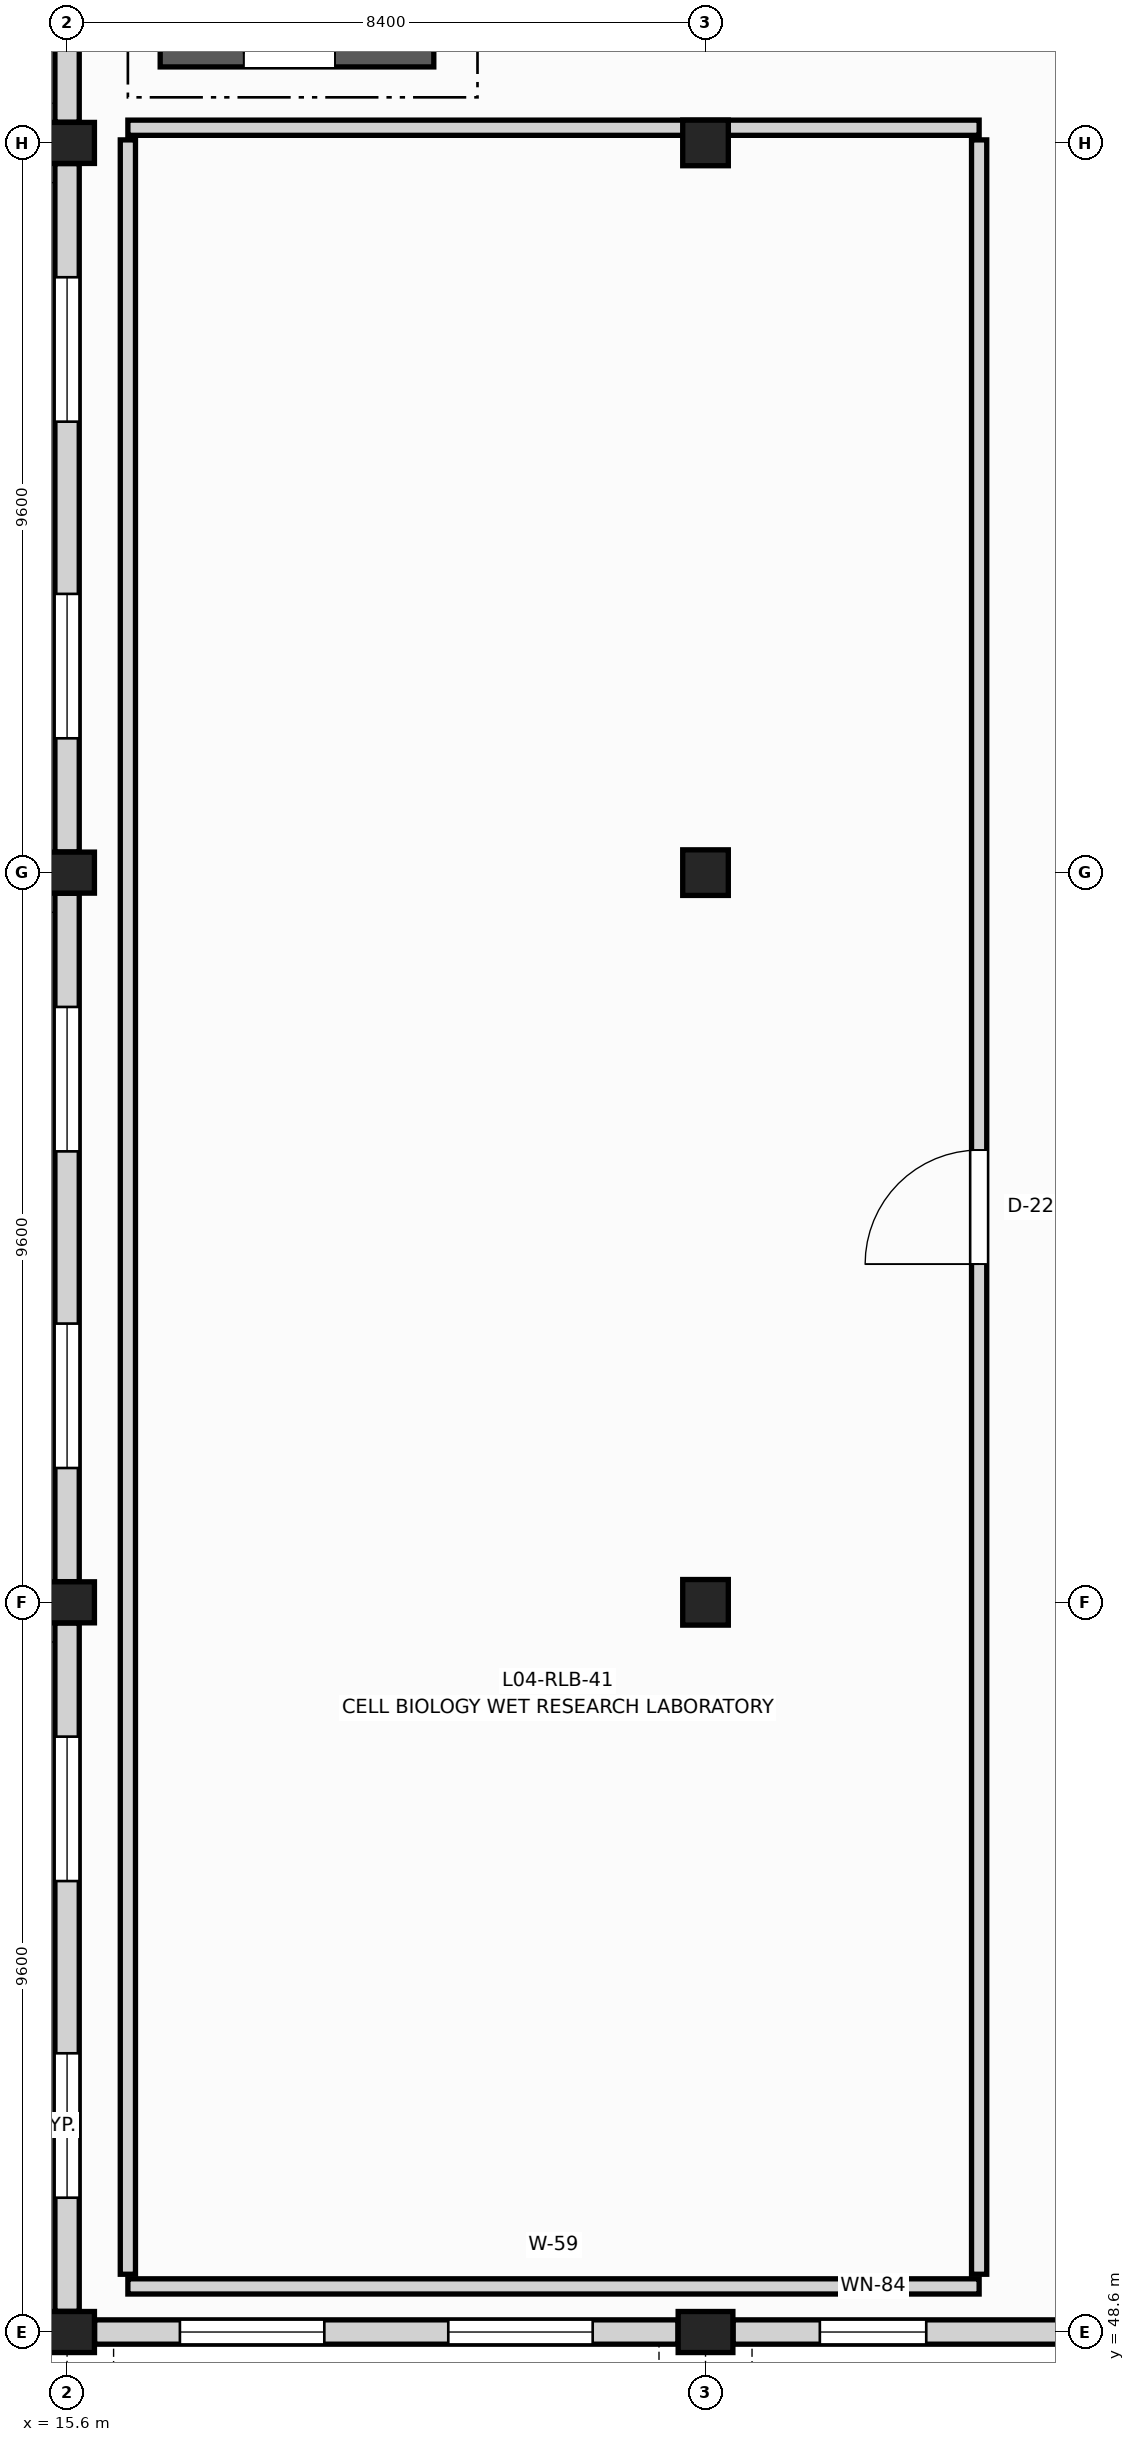
"""IFC4 building model, lengths in metres.
Left out: names, types, materials, properties, quantities, classifications, styles, units other than length and angle.
Written with IfcOpenShell. Run it as: python <this file> out.ifc"""

import sys

from ifc_helpers import new_model, si_unit, direction, frame, frame_2d, origin, origin_2d, place, context, subcontext, project, spatial, rectangle, extrude, element, fill, save


model = new_model("IFC4")
c1 = context("Model", 3, precision=1e-05, world=origin(), true_north=direction((0.0, 1.0)))
c2 = subcontext(c1, "Body", "Model", "MODEL_VIEW")
j1 = project(units=[si_unit("LENGTHUNIT", "METRE"), si_unit("PLANEANGLEUNIT", "RADIAN")], contexts=[c1])
p1 = place(None, origin())
s1 = spatial("IfcSite", under=j1, at=p1, CompositionType="ELEMENT")
p2 = place(p1, origin())
s2 = spatial("IfcBuilding", under=s1, at=p2, CompositionType="ELEMENT")
p3 = place(p2, frame((0.0, 0.0, 18.3)))
s3 = spatial("IfcBuildingStorey", under=s2, at=p3, CompositionType="ELEMENT", Elevation=18.3)
for number, where, z_axis, x_axis in (
    (1, (15.6, 48.6, 0.0), (0.0, 0.0, 1.0), (1.0, 0.0, 0.0)),
    (2, (15.6, 58.2, 0.0), (0.0, 0.0, 1.0), (1.0, 0.0, 0.0)),
    (3, (15.6, 67.8, 0.0), (0.0, 0.0, 1.0), (1.0, 0.0, 0.0)),
    (4, (15.6, 77.4, 0.0), (0.0, 0.0, 1.0), (1.0, 0.0, 0.0)),
    (5, (24.0, 48.6, 0.0), (0.0, 0.0, 1.0), (1.0, 0.0, 0.0)),
):
    element("IfcColumn", number, at=place(p3, frame(where, z_axis=z_axis, x_axis=x_axis)), inside=s3, PredefinedType="COLUMN", context=c2, shape_type="SweptSolid", body=[
        extrude(rectangle(XDim=0.72, YDim=0.54, at=origin_2d()), origin(), (0.0, 0.0, 1.0), 3.9),
    ])
for number, where, z_axis, x_axis in (
    (6, (24.0, 58.2, 0.0), (0.0, 0.0, 1.0), (1.0, 0.0, 0.0)),
    (7, (24.0, 67.8, 0.0), (0.0, 0.0, 1.0), (1.0, 0.0, 0.0)),
    (8, (24.0, 77.4, 0.0), (0.0, 0.0, 1.0), (1.0, 0.0, 0.0)),
):
    element("IfcColumn", number, at=place(p3, frame(where, z_axis=z_axis, x_axis=x_axis)), inside=s3, PredefinedType="COLUMN", context=c2, shape_type="SweptSolid", body=[
        extrude(rectangle(XDim=0.6, YDim=0.6, at=origin_2d()), origin(), (0.0, 0.0, 1.0), 3.9),
    ])
p4 = place(p3, frame((15.6, 48.872, 0.0), z_axis=(0.0, 0.0, 1.0), x_axis=(0.0, 1.0, 0.0)))
e9 = element("IfcWall", 9, at=p4, inside=s3, PredefinedType="SOLIDWALL", context=c2, shape_type="SweptSolid", body=[
    extrude(rectangle(XDim=9.056, YDim=0.32, at=frame_2d((4.528, 0.0))), origin(), (0.0, 0.0, 1.0), 3.08),
])
p5 = place(p4, frame((1.495, 0.0, 0.85)))
e10 = element("IfcOpeningElement", 10, at=p5, cuts=e9, PredefinedType="OPENING", context=c2, shape_type="SweptSolid", body=[
    extrude(rectangle(XDim=1.9, YDim=1.85, at=frame_2d((0.95, 0.925))), frame((0.0, 0.17, 0.0), z_axis=(0.0, -1.0, 0.0), x_axis=(1.0, 0.0, 0.0)), (0.0, 0.0, 1.0), 0.34),
])
p6 = place(p4, frame((5.661, 0.0, 0.85)))
e11 = element("IfcOpeningElement", 11, at=p6, cuts=e9, PredefinedType="OPENING", context=c2, shape_type="SweptSolid", body=[
    extrude(rectangle(XDim=1.9, YDim=1.85, at=frame_2d((0.95, 0.925))), frame((0.0, 0.17, 0.0), z_axis=(0.0, -1.0, 0.0), x_axis=(1.0, 0.0, 0.0)), (0.0, 0.0, 1.0), 0.34),
])
p7 = place(p3, frame((15.6, 58.472, 0.0), z_axis=(0.0, 0.0, 1.0), x_axis=(0.0, 1.0, 0.0)))
e12 = element("IfcWall", 12, at=p7, inside=s3, PredefinedType="SOLIDWALL", context=c2, shape_type="SweptSolid", body=[
    extrude(rectangle(XDim=9.056, YDim=0.32, at=frame_2d((4.528, 0.0))), origin(), (0.0, 0.0, 1.0), 3.08),
])
p8 = place(p7, frame((1.495, 0.0, 0.85)))
e13 = element("IfcOpeningElement", 13, at=p8, cuts=e12, PredefinedType="OPENING", context=c2, shape_type="SweptSolid", body=[
    extrude(rectangle(XDim=1.9, YDim=1.85, at=frame_2d((0.95, 0.925))), frame((0.0, 0.17, 0.0), z_axis=(0.0, -1.0, 0.0), x_axis=(1.0, 0.0, 0.0)), (0.0, 0.0, 1.0), 0.34),
])
p9 = place(p7, frame((5.661, 0.0, 0.85)))
e14 = element("IfcOpeningElement", 14, at=p9, cuts=e12, PredefinedType="OPENING", context=c2, shape_type="SweptSolid", body=[
    extrude(rectangle(XDim=1.9, YDim=1.85, at=frame_2d((0.95, 0.925))), frame((0.0, 0.17, 0.0), z_axis=(0.0, -1.0, 0.0), x_axis=(1.0, 0.0, 0.0)), (0.0, 0.0, 1.0), 0.34),
])
p10 = place(p3, frame((15.6, 68.072, 0.0), z_axis=(0.0, 0.0, 1.0), x_axis=(0.0, 1.0, 0.0)))
e15 = element("IfcWall", 15, at=p10, inside=s3, PredefinedType="SOLIDWALL", context=c2, shape_type="SweptSolid", body=[
    extrude(rectangle(XDim=9.056, YDim=0.32, at=frame_2d((4.528, 0.0))), origin(), (0.0, 0.0, 1.0), 3.08),
])
p11 = place(p10, frame((1.495, 0.0, 0.85)))
e16 = element("IfcOpeningElement", 16, at=p11, cuts=e15, PredefinedType="OPENING", context=c2, shape_type="SweptSolid", body=[
    extrude(rectangle(XDim=1.9, YDim=1.85, at=frame_2d((0.95, 0.925))), frame((0.0, 0.17, 0.0), z_axis=(0.0, -1.0, 0.0), x_axis=(1.0, 0.0, 0.0)), (0.0, 0.0, 1.0), 0.34),
])
p12 = place(p10, frame((5.661, 0.0, 0.85)))
e17 = element("IfcOpeningElement", 17, at=p12, cuts=e15, PredefinedType="OPENING", context=c2, shape_type="SweptSolid", body=[
    extrude(rectangle(XDim=1.9, YDim=1.85, at=frame_2d((0.95, 0.925))), frame((0.0, 0.17, 0.0), z_axis=(0.0, -1.0, 0.0), x_axis=(1.0, 0.0, 0.0)), (0.0, 0.0, 1.0), 0.34),
])
p13 = place(p3, frame((15.6, 77.672, 0.0), z_axis=(0.0, 0.0, 1.0), x_axis=(0.0, 1.0, 0.0)))
e18 = element("IfcWall", 18, at=p13, inside=s3, PredefinedType="SOLIDWALL", context=c2, shape_type="SweptSolid", body=[
    extrude(rectangle(XDim=8.976, YDim=0.32, at=frame_2d((4.488, 0.0))), origin(), (0.0, 0.0, 1.0), 3.08),
])
p14 = place(p13, frame((1.473, 0.0, 0.85)))
e19 = element("IfcOpeningElement", 19, at=p14, cuts=e18, PredefinedType="OPENING", context=c2, shape_type="SweptSolid", body=[
    extrude(rectangle(XDim=1.9, YDim=1.85, at=frame_2d((0.95, 0.925))), frame((0.0, 0.17, 0.0), z_axis=(0.0, -1.0, 0.0), x_axis=(1.0, 0.0, 0.0)), (0.0, 0.0, 1.0), 0.34),
])
p15 = place(p13, frame((5.603, 0.0, 0.85)))
e20 = element("IfcOpeningElement", 20, at=p15, cuts=e18, PredefinedType="OPENING", context=c2, shape_type="SweptSolid", body=[
    extrude(rectangle(XDim=1.9, YDim=1.85, at=frame_2d((0.95, 0.925))), frame((0.0, 0.17, 0.0), z_axis=(0.0, -1.0, 0.0), x_axis=(1.0, 0.0, 0.0)), (0.0, 0.0, 1.0), 0.34),
])
p16 = place(p3, frame((15.962, 48.6, 0.0), z_axis=(0.0, 0.0, 1.0), x_axis=(1.0, 0.0, 0.0)))
e21 = element("IfcWall", 21, at=p16, inside=s3, PredefinedType="SOLIDWALL", context=c2, shape_type="SweptSolid", body=[
    extrude(rectangle(XDim=7.676, YDim=0.32, at=frame_2d((3.838, 0.0))), origin(), (0.0, 0.0, 1.0), 3.08),
])
p17 = place(p16, frame((1.123, 0.0, 0.85)))
e22 = element("IfcOpeningElement", 22, at=p17, cuts=e21, PredefinedType="OPENING", context=c2, shape_type="SweptSolid", body=[
    extrude(rectangle(XDim=1.9, YDim=1.85, at=frame_2d((0.95, 0.925))), frame((0.0, 0.17, 0.0), z_axis=(0.0, -1.0, 0.0), x_axis=(1.0, 0.0, 0.0)), (0.0, 0.0, 1.0), 0.34),
])
p18 = place(p16, frame((4.654, 0.0, 0.85)))
e23 = element("IfcOpeningElement", 23, at=p18, cuts=e21, PredefinedType="OPENING", context=c2, shape_type="SweptSolid", body=[
    extrude(rectangle(XDim=1.9, YDim=1.85, at=frame_2d((0.95, 0.925))), frame((0.0, 0.17, 0.0), z_axis=(0.0, -1.0, 0.0), x_axis=(1.0, 0.0, 0.0)), (0.0, 0.0, 1.0), 0.34),
])
p19 = place(p3, frame((24.362, 48.6, 0.0), z_axis=(0.0, 0.0, 1.0), x_axis=(1.0, 0.0, 0.0)))
e24 = element("IfcWall", 24, at=p19, inside=s3, PredefinedType="SOLIDWALL", context=c2, shape_type="SweptSolid", body=[
    extrude(rectangle(XDim=7.676, YDim=0.32, at=frame_2d((3.838, 0.0))), origin(), (0.0, 0.0, 1.0), 3.08),
])
p20 = place(p19, frame((1.142, 0.0, 0.85)))
e25 = element("IfcOpeningElement", 25, at=p20, cuts=e24, PredefinedType="OPENING", context=c2, shape_type="SweptSolid", body=[
    extrude(rectangle(XDim=1.4, YDim=1.65, at=frame_2d((0.7, 0.825))), frame((0.0, 0.17, 0.0), z_axis=(0.0, -1.0, 0.0), x_axis=(1.0, 0.0, 0.0)), (0.0, 0.0, 1.0), 0.34),
])
p21 = place(p3, frame((16.825, 78.575, 0.0), z_axis=(0.0, 0.0, 1.0), x_axis=(1.0, 0.0, 0.0)))
e26 = element("IfcWall", 26, at=p21, inside=s3, PredefinedType="SHEAR", context=c2, shape_type="SweptSolid", body=[
    extrude(rectangle(XDim=3.6, YDim=0.35, at=frame_2d((1.8, 0.0))), origin(), (0.0, 0.0, 1.0), 3.9),
])
p22 = place(p21, frame((1.1, 0.0, 0.0)))
e27 = element("IfcOpeningElement", 27, at=p22, cuts=e26, PredefinedType="OPENING", context=c2, shape_type="SweptSolid", body=[
    extrude(rectangle(XDim=1.2, YDim=2.2, at=frame_2d((0.6, 1.1))), frame((0.0, 0.185, 0.0), z_axis=(0.0, -1.0, 0.0), x_axis=(1.0, 0.0, 0.0)), (0.0, 0.0, 1.0), 0.37),
])
for number, where, z_axis, x_axis in (
    (28, (16.4, 49.2, 0.0), (0.0, 0.0, 1.0), (1.0, 0.0, 0.0)),
    (29, (16.4, 77.6, 0.0), (0.0, 0.0, 1.0), (1.0, 0.0, 0.0)),
):
    element("IfcWall", number, at=place(p3, frame(where, z_axis=z_axis, x_axis=x_axis)), inside=s3, PredefinedType="PARTITIONING", context=c2, shape_type="SweptSolid", body=[
        extrude(rectangle(XDim=11.2, YDim=0.2, at=frame_2d((5.6, 0.0))), origin(), (0.0, 0.0, 1.0), 3.15),
    ])
p23 = place(p3, frame((16.4, 49.36, 0.0), z_axis=(0.0, 0.0, 1.0), x_axis=(0.0, 1.0, 0.0)))
e30 = element("IfcWall", 30, at=p23, inside=s3, PredefinedType="PARTITIONING", context=c2, shape_type="SweptSolid", body=[
    extrude(rectangle(XDim=28.08, YDim=0.2, at=frame_2d((14.04, 0.0))), origin(), (0.0, 0.0, 1.0), 3.15),
])
p24 = place(p3, frame((27.6, 49.36, 0.0), z_axis=(0.0, 0.0, 1.0), x_axis=(0.0, 1.0, 0.0)))
e31 = element("IfcWall", 31, at=p24, inside=s3, PredefinedType="PARTITIONING", context=c2, shape_type="SweptSolid", body=[
    extrude(rectangle(XDim=28.08, YDim=0.2, at=frame_2d((14.04, 0.0))), origin(), (0.0, 0.0, 1.0), 3.15),
])
p25 = place(p24, frame((13.29, 0.0, 0.0)))
e32 = element("IfcOpeningElement", 32, at=p25, cuts=e31, PredefinedType="OPENING", context=c2, shape_type="SweptSolid", body=[
    extrude(rectangle(XDim=1.5, YDim=2.2, at=frame_2d((0.75, 1.1))), frame((0.0, 0.11, 0.0), z_axis=(0.0, -1.0, 0.0), x_axis=(1.0, 0.0, 0.0)), (0.0, 0.0, 1.0), 0.22),
])
p26 = place(p5, origin())
e33 = element("IfcWindow", 33, at=p26, inside=s3, PartitioningType="SINGLE_PANEL", PredefinedType="WINDOW", context=c2, shape_type="SweptSolid", body=[
    extrude(rectangle(XDim=1.9, YDim=1.85, at=frame_2d((0.95, 0.925))), frame((0.0, 0.03, 0.0), z_axis=(0.0, -1.0, 0.0), x_axis=(1.0, 0.0, 0.0)), (0.0, 0.0, 1.0), 0.06),
])
fill(e10, e33)
p27 = place(p6, origin())
e34 = element("IfcWindow", 34, at=p27, inside=s3, PartitioningType="SINGLE_PANEL", PredefinedType="WINDOW", context=c2, shape_type="SweptSolid", body=[
    extrude(rectangle(XDim=1.9, YDim=1.85, at=frame_2d((0.95, 0.925))), frame((0.0, 0.03, 0.0), z_axis=(0.0, -1.0, 0.0), x_axis=(1.0, 0.0, 0.0)), (0.0, 0.0, 1.0), 0.06),
])
fill(e11, e34)
p28 = place(p8, origin())
e35 = element("IfcWindow", 35, at=p28, inside=s3, PartitioningType="SINGLE_PANEL", PredefinedType="WINDOW", context=c2, shape_type="SweptSolid", body=[
    extrude(rectangle(XDim=1.9, YDim=1.85, at=frame_2d((0.95, 0.925))), frame((0.0, 0.03, 0.0), z_axis=(0.0, -1.0, 0.0), x_axis=(1.0, 0.0, 0.0)), (0.0, 0.0, 1.0), 0.06),
])
fill(e13, e35)
p29 = place(p9, origin())
e36 = element("IfcWindow", 36, at=p29, inside=s3, PartitioningType="SINGLE_PANEL", PredefinedType="WINDOW", context=c2, shape_type="SweptSolid", body=[
    extrude(rectangle(XDim=1.9, YDim=1.85, at=frame_2d((0.95, 0.925))), frame((0.0, 0.03, 0.0), z_axis=(0.0, -1.0, 0.0), x_axis=(1.0, 0.0, 0.0)), (0.0, 0.0, 1.0), 0.06),
])
fill(e14, e36)
p30 = place(p11, origin())
e37 = element("IfcWindow", 37, at=p30, inside=s3, PartitioningType="SINGLE_PANEL", PredefinedType="WINDOW", context=c2, shape_type="SweptSolid", body=[
    extrude(rectangle(XDim=1.9, YDim=1.85, at=frame_2d((0.95, 0.925))), frame((0.0, 0.03, 0.0), z_axis=(0.0, -1.0, 0.0), x_axis=(1.0, 0.0, 0.0)), (0.0, 0.0, 1.0), 0.06),
])
fill(e16, e37)
p31 = place(p12, origin())
e38 = element("IfcWindow", 38, at=p31, inside=s3, PartitioningType="SINGLE_PANEL", PredefinedType="WINDOW", context=c2, shape_type="SweptSolid", body=[
    extrude(rectangle(XDim=1.9, YDim=1.85, at=frame_2d((0.95, 0.925))), frame((0.0, 0.03, 0.0), z_axis=(0.0, -1.0, 0.0), x_axis=(1.0, 0.0, 0.0)), (0.0, 0.0, 1.0), 0.06),
])
fill(e17, e38)
p32 = place(p17, origin())
e39 = element("IfcWindow", 39, at=p32, inside=s3, PartitioningType="SINGLE_PANEL", PredefinedType="WINDOW", context=c2, shape_type="SweptSolid", body=[
    extrude(rectangle(XDim=1.9, YDim=1.85, at=frame_2d((0.95, 0.925))), frame((0.0, 0.03, 0.0), z_axis=(0.0, -1.0, 0.0), x_axis=(1.0, 0.0, 0.0)), (0.0, 0.0, 1.0), 0.06),
])
fill(e22, e39)
p33 = place(p18, origin())
e40 = element("IfcWindow", 40, at=p33, inside=s3, PartitioningType="SINGLE_PANEL", PredefinedType="WINDOW", context=c2, shape_type="SweptSolid", body=[
    extrude(rectangle(XDim=1.9, YDim=1.85, at=frame_2d((0.95, 0.925))), frame((0.0, 0.03, 0.0), z_axis=(0.0, -1.0, 0.0), x_axis=(1.0, 0.0, 0.0)), (0.0, 0.0, 1.0), 0.06),
])
fill(e23, e40)
p34 = place(p20, origin())
e41 = element("IfcWindow", 41, at=p34, inside=s3, PartitioningType="SINGLE_PANEL", PredefinedType="WINDOW", context=c2, shape_type="SweptSolid", body=[
    extrude(rectangle(XDim=1.4, YDim=1.65, at=frame_2d((0.7, 0.825))), frame((0.0, 0.03, 0.0), z_axis=(0.0, -1.0, 0.0), x_axis=(1.0, 0.0, 0.0)), (0.0, 0.0, 1.0), 0.06),
])
fill(e25, e41)
p35 = place(p22, origin())
e42 = element("IfcDoor", 42, at=p35, inside=s3, OperationType="SINGLE_SWING_LEFT", PredefinedType="DOOR", context=c2, shape_type="SweptSolid", body=[
    extrude(rectangle(XDim=1.2, YDim=2.2, at=frame_2d((0.6, 1.1))), frame((0.0, 0.025, 0.0), z_axis=(0.0, -1.0, 0.0), x_axis=(1.0, 0.0, 0.0)), (0.0, 0.0, 1.0), 0.05),
])
fill(e27, e42)
p36 = place(p25, origin())
e43 = element("IfcDoor", 43, at=p36, inside=s3, OperationType="SINGLE_SWING_LEFT", PredefinedType="DOOR", context=c2, shape_type="SweptSolid", body=[
    extrude(rectangle(XDim=1.5, YDim=2.2, at=frame_2d((0.75, 1.1))), frame((0.0, 0.025, 0.0), z_axis=(0.0, -1.0, 0.0), x_axis=(1.0, 0.0, 0.0)), (0.0, 0.0, 1.0), 0.05),
])
fill(e32, e43)
save(model, sys.argv[1])
